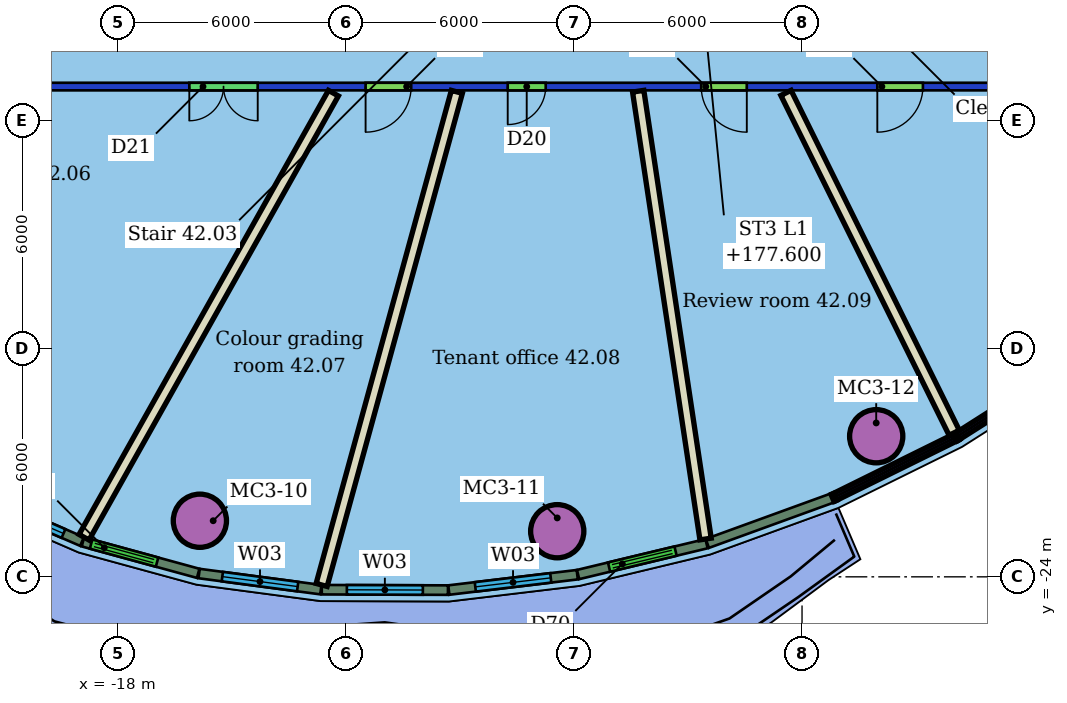
"""IFC4 building model, lengths in metres.
Left out: names, types, materials, properties, quantities, classifications, styles, units other than length and angle.
Written with IfcOpenShell. Run it as: python <this file> out.ifc"""

import sys

from ifc_helpers import new_model, si_unit, direction, frame, frame_2d, origin, origin_2d, place, context, subcontext, project, spatial, rectangle, hollow_circle, extrude, element, fill, save


model = new_model("IFC4")
c1 = context("Model", 3, precision=1e-05, world=origin(), true_north=direction((0.0, 1.0)))
c2 = subcontext(c1, "Body", "Model", "MODEL_VIEW")
j1 = project(units=[si_unit("LENGTHUNIT", "METRE"), si_unit("PLANEANGLEUNIT", "RADIAN")], contexts=[c1])
p1 = place(None, origin())
s1 = spatial("IfcSite", under=j1, at=p1, CompositionType="ELEMENT")
p2 = place(p1, origin())
s2 = spatial("IfcBuilding", under=s1, at=p2, CompositionType="ELEMENT")
p3 = place(p2, frame((0.0, 0.0, 175.8)))
s3 = spatial("IfcBuildingStorey", under=s2, at=p3, CompositionType="ELEMENT", Elevation=175.8)
for number, where, z_axis, x_axis in (
    (1, (-15.845, -22.524, 0.0), (0.0, 0.0, 1.0), (1.0, 0.0, 0.0)),
    (2, (-6.442, -22.8, 0.0), (0.0, 0.0, 1.0), (1.0, 0.0, 0.0)),
    (3, (1.952, -20.301, 0.0), (0.0, 0.0, 1.0), (1.0, 0.0, 0.0)),
):
    element("IfcColumn", number, at=place(p3, frame(where, z_axis=z_axis, x_axis=x_axis)), inside=s3, PredefinedType="COLUMN", context=c2, shape_type="SweptSolid", body=[
        extrude(hollow_circle(Radius=0.7, WallThickness=0.05, at=origin_2d()), origin(), (0.0, 0.0, 1.0), 3.4),
    ])
p4 = place(p3, frame((8.2, -11.1, 0.0), z_axis=(0.0, 0.0, 1.0), x_axis=(-1.0, 0.0, 0.0)))
e4 = element("IfcWall", 4, at=p4, inside=s3, PredefinedType="PARTITIONING", context=c2, shape_type="SweptSolid", body=[
    extrude(rectangle(XDim=28.4, YDim=0.2, at=frame_2d((14.2, 0.0))), origin(), (0.0, 0.0, 1.0), 3.0),
])
p5 = place(p4, frame((22.523, 0.0, 0.0)))
e5 = element("IfcOpeningElement", 5, at=p5, cuts=e4, PredefinedType="OPENING", context=c2, shape_type="SweptSolid", body=[
    extrude(rectangle(XDim=1.8, YDim=2.1, at=frame_2d((0.9, 1.05))), frame((0.0, 0.11, 0.0), z_axis=(0.0, -1.0, 0.0), x_axis=(1.0, 0.0, 0.0)), (0.0, 0.0, 1.0), 0.22),
])
p6 = place(p4, frame((18.485, 0.0, 0.0)))
e6 = element("IfcOpeningElement", 6, at=p6, cuts=e4, PredefinedType="OPENING", context=c2, shape_type="SweptSolid", body=[
    extrude(rectangle(XDim=1.2, YDim=2.1, at=frame_2d((0.6, 1.05))), frame((0.0, 0.11, 0.0), z_axis=(0.0, -1.0, 0.0), x_axis=(1.0, 0.0, 0.0)), (0.0, 0.0, 1.0), 0.22),
])
p7 = place(p4, frame((14.945, 0.0, 0.0)))
e7 = element("IfcOpeningElement", 7, at=p7, cuts=e4, PredefinedType="OPENING", context=c2, shape_type="SweptSolid", body=[
    extrude(rectangle(XDim=1.0, YDim=2.1, at=frame_2d((0.5, 1.05))), frame((0.0, 0.11, 0.0), z_axis=(0.0, -1.0, 0.0), x_axis=(1.0, 0.0, 0.0)), (0.0, 0.0, 1.0), 0.22),
])
p8 = place(p4, frame((9.653, 0.0, 0.0)))
e8 = element("IfcOpeningElement", 8, at=p8, cuts=e4, PredefinedType="OPENING", context=c2, shape_type="SweptSolid", body=[
    extrude(rectangle(XDim=1.2, YDim=2.1, at=frame_2d((0.6, 1.05))), frame((0.0, 0.11, 0.0), z_axis=(0.0, -1.0, 0.0), x_axis=(1.0, 0.0, 0.0)), (0.0, 0.0, 1.0), 0.22),
])
p9 = place(p4, frame((5.019, 0.0, 0.0)))
e9 = element("IfcOpeningElement", 9, at=p9, cuts=e4, PredefinedType="OPENING", context=c2, shape_type="SweptSolid", body=[
    extrude(rectangle(XDim=1.2, YDim=2.1, at=frame_2d((0.6, 1.05))), frame((0.0, 0.11, 0.0), z_axis=(0.0, -1.0, 0.0), x_axis=(1.0, 0.0, 0.0)), (0.0, 0.0, 1.0), 0.22),
])
p10 = place(p3, frame((-18.894, -22.958, 0.0), z_axis=(0.0, 0.0, 1.0), x_axis=(0.489668651608, 0.871908602798, 0.0)))
e10 = element("IfcWall", 10, at=p10, inside=s3, PredefinedType="PARTITIONING", context=c2, shape_type="SweptSolid", body=[
    extrude(rectangle(XDim=13.401, YDim=0.3, at=frame_2d((6.701, 0.0))), origin(), (0.0, 0.0, 1.0), 3.4),
])
p11 = place(p3, frame((-12.641, -24.214, 0.0), z_axis=(0.0, 0.0, 1.0), x_axis=(0.264514468867, 0.964381716832, 0.0)))
e11 = element("IfcWall", 11, at=p11, inside=s3, PredefinedType="PARTITIONING", context=c2, shape_type="SweptSolid", body=[
    extrude(rectangle(XDim=13.453, YDim=0.3, at=frame_2d((6.727, 0.0))), origin(), (0.0, 0.0, 1.0), 3.4),
])
p12 = place(p3, frame((-2.538, -23.005, 0.0), z_axis=(0.0, 0.0, 1.0), x_axis=(-0.14879531589, 0.988868016456, 0.0)))
e12 = element("IfcWall", 12, at=p12, inside=s3, PredefinedType="PARTITIONING", context=c2, shape_type="SweptSolid", body=[
    extrude(rectangle(XDim=11.915, YDim=0.3, at=frame_2d((5.958, 0.0))), origin(), (0.0, 0.0, 1.0), 3.4),
])
p13 = place(p3, frame((4.004, -20.209, 0.0), z_axis=(0.0, 0.0, 1.0), x_axis=(-0.443647752569, 0.896201245056, 0.0)))
e13 = element("IfcWall", 13, at=p13, inside=s3, PredefinedType="PARTITIONING", context=c2, shape_type="SweptSolid", body=[
    extrude(rectangle(XDim=9.979, YDim=0.3, at=frame_2d((4.989, 0.0))), origin(), (0.0, 0.0, 1.0), 3.4),
])
p14 = place(p3, frame((-21.757, -21.853, 0.0), z_axis=(0.0, 0.0, 1.0), x_axis=(0.917458663887, -0.397831120023, 0.0)))
e14 = element("IfcWall", 14, at=p14, inside=s3, PredefinedType="SOLIDWALL", context=c2, shape_type="SweptSolid", body=[
    extrude(rectangle(XDim=3.063, YDim=0.25, at=frame_2d((1.531, 0.0))), origin(), (0.0, 0.0, 1.0), 3.05),
])
p15 = place(p14, frame((0.531, 0.0, 0.9)))
e15 = element("IfcOpeningElement", 15, at=p15, cuts=e14, PredefinedType="OPENING", context=c2, shape_type="SweptSolid", body=[
    extrude(rectangle(XDim=2.0, YDim=2.1, at=frame_2d((1.0, 1.05))), frame((0.0, 0.135, 0.0), z_axis=(0.0, -1.0, 0.0), x_axis=(1.0, 0.0, 0.0)), (0.0, 0.0, 1.0), 0.27),
])
p16 = place(p3, frame((-18.922, -23.08, 0.0), z_axis=(0.0, 0.0, 1.0), x_axis=(0.964636462647, -0.263583942857, 0.0)))
e16 = element("IfcWall", 16, at=p16, inside=s3, PredefinedType="SOLIDWALL", context=c2, shape_type="SweptSolid", body=[
    extrude(rectangle(XDim=3.144, YDim=0.25, at=frame_2d((1.572, 0.0))), origin(), (0.0, 0.0, 1.0), 3.05),
])
p17 = place(p16, frame((0.222, 0.0, 0.0)))
e17 = element("IfcOpeningElement", 17, at=p17, cuts=e16, PredefinedType="OPENING", context=c2, shape_type="SweptSolid", body=[
    extrude(rectangle(XDim=1.8, YDim=2.4, at=frame_2d((0.9, 1.2))), frame((0.0, 0.135, 0.0), z_axis=(0.0, -1.0, 0.0), x_axis=(1.0, 0.0, 0.0)), (0.0, 0.0, 1.0), 0.27),
])
p18 = place(p3, frame((-15.865, -23.913, 0.0), z_axis=(0.0, 0.0, 1.0), x_axis=(0.991363289686, -0.131144301676, 0.0)))
e18 = element("IfcWall", 18, at=p18, inside=s3, PredefinedType="SOLIDWALL", context=c2, shape_type="SweptSolid", body=[
    extrude(rectangle(XDim=3.232, YDim=0.25, at=frame_2d((1.616, 0.0))), origin(), (0.0, 0.0, 1.0), 3.05),
])
p19 = place(p18, frame((0.616, 0.0, 0.9)))
e19 = element("IfcOpeningElement", 19, at=p19, cuts=e18, PredefinedType="OPENING", context=c2, shape_type="SweptSolid", body=[
    extrude(rectangle(XDim=2.0, YDim=2.1, at=frame_2d((1.0, 1.05))), frame((0.0, 0.135, 0.0), z_axis=(0.0, -1.0, 0.0), x_axis=(1.0, 0.0, 0.0)), (0.0, 0.0, 1.0), 0.27),
])
p20 = place(p3, frame((-12.638, -24.339, 0.0), z_axis=(0.0, 0.0, 1.0), x_axis=(0.999994765707, -0.003235515089, 0.0)))
e20 = element("IfcWall", 20, at=p20, inside=s3, PredefinedType="SOLIDWALL", context=c2, shape_type="SweptSolid", body=[
    extrude(rectangle(XDim=3.32, YDim=0.25, at=frame_2d((1.66, 0.0))), origin(), (0.0, 0.0, 1.0), 3.05),
])
p21 = place(p20, frame((0.66, 0.0, 0.9)))
e21 = element("IfcOpeningElement", 21, at=p21, cuts=e20, PredefinedType="OPENING", context=c2, shape_type="SweptSolid", body=[
    extrude(rectangle(XDim=2.0, YDim=2.1, at=frame_2d((1.0, 1.05))), frame((0.0, 0.135, 0.0), z_axis=(0.0, -1.0, 0.0), x_axis=(1.0, 0.0, 0.0)), (0.0, 0.0, 1.0), 0.27),
])
p22 = place(p3, frame((-9.294, -24.348, 0.0), z_axis=(0.0, 0.0, 1.0), x_axis=(0.992928000629, 0.118718092836, 0.0)))
e22 = element("IfcWall", 22, at=p22, inside=s3, PredefinedType="SOLIDWALL", context=c2, shape_type="SweptSolid", body=[
    extrude(rectangle(XDim=3.404, YDim=0.25, at=frame_2d((1.702, 0.0))), origin(), (0.0, 0.0, 1.0), 3.05),
])
p23 = place(p22, frame((0.702, 0.0, 0.9)))
e23 = element("IfcOpeningElement", 23, at=p23, cuts=e22, PredefinedType="OPENING", context=c2, shape_type="SweptSolid", body=[
    extrude(rectangle(XDim=2.0, YDim=2.1, at=frame_2d((1.0, 1.05))), frame((0.0, 0.135, 0.0), z_axis=(0.0, -1.0, 0.0), x_axis=(1.0, 0.0, 0.0)), (0.0, 0.0, 1.0), 0.27),
])
p24 = place(p3, frame((-5.893, -23.94, 0.0), z_axis=(0.0, 0.0, 1.0), x_axis=(0.97230053317, 0.233734193469, 0.0)))
e24 = element("IfcWall", 24, at=p24, inside=s3, PredefinedType="SOLIDWALL", context=c2, shape_type="SweptSolid", body=[
    extrude(rectangle(XDim=3.476, YDim=0.25, at=frame_2d((1.738, 0.0))), origin(), (0.0, 0.0, 1.0), 3.05),
])
p25 = place(p24, frame((0.838, 0.0, 0.0)))
e25 = element("IfcOpeningElement", 25, at=p25, cuts=e24, PredefinedType="OPENING", context=c2, shape_type="SweptSolid", body=[
    extrude(rectangle(XDim=1.8, YDim=2.4, at=frame_2d((0.9, 1.2))), frame((0.0, 0.135, 0.0), z_axis=(0.0, -1.0, 0.0), x_axis=(1.0, 0.0, 0.0)), (0.0, 0.0, 1.0), 0.27),
])
p26 = place(p3, frame((-2.492, -23.121, 0.0), z_axis=(0.0, 0.0, 1.0), x_axis=(0.939842425933, 0.341608276271, 0.0)))
e26 = element("IfcWall", 26, at=p26, inside=s3, PredefinedType="SOLIDWALL", context=c2, shape_type="SweptSolid", body=[
    extrude(rectangle(XDim=3.49, YDim=0.25, at=frame_2d((1.745, 0.0))), origin(), (0.0, 0.0, 1.0), 3.05),
])
p27 = place(p5, origin())
e27 = element("IfcDoor", 27, at=p27, inside=s3, OperationType="DOUBLE_DOOR_SINGLE_SWING", PredefinedType="DOOR", context=c2, shape_type="SweptSolid", body=[
    extrude(rectangle(XDim=1.8, YDim=2.1, at=frame_2d((0.9, 1.05))), frame((0.0, 0.025, 0.0), z_axis=(0.0, -1.0, 0.0), x_axis=(1.0, 0.0, 0.0)), (0.0, 0.0, 1.0), 0.05),
])
fill(e5, e27)
p28 = place(p6, origin())
e28 = element("IfcDoor", 28, at=p28, inside=s3, OperationType="SINGLE_SWING_RIGHT", PredefinedType="DOOR", context=c2, shape_type="SweptSolid", body=[
    extrude(rectangle(XDim=1.2, YDim=2.1, at=frame_2d((0.6, 1.05))), frame((0.0, 0.025, 0.0), z_axis=(0.0, -1.0, 0.0), x_axis=(1.0, 0.0, 0.0)), (0.0, 0.0, 1.0), 0.05),
])
fill(e6, e28)
p29 = place(p7, origin())
e29 = element("IfcDoor", 29, at=p29, inside=s3, OperationType="SINGLE_SWING_RIGHT", PredefinedType="DOOR", context=c2, shape_type="SweptSolid", body=[
    extrude(rectangle(XDim=1.0, YDim=2.1, at=frame_2d((0.5, 1.05))), frame((0.0, 0.025, 0.0), z_axis=(0.0, -1.0, 0.0), x_axis=(1.0, 0.0, 0.0)), (0.0, 0.0, 1.0), 0.05),
])
fill(e7, e29)
p30 = place(p8, origin())
e30 = element("IfcDoor", 30, at=p30, inside=s3, OperationType="SINGLE_SWING_LEFT", PredefinedType="DOOR", context=c2, shape_type="SweptSolid", body=[
    extrude(rectangle(XDim=1.2, YDim=2.1, at=frame_2d((0.6, 1.05))), frame((0.0, 0.025, 0.0), z_axis=(0.0, -1.0, 0.0), x_axis=(1.0, 0.0, 0.0)), (0.0, 0.0, 1.0), 0.05),
])
fill(e8, e30)
p31 = place(p9, origin())
e31 = element("IfcDoor", 31, at=p31, inside=s3, OperationType="SINGLE_SWING_RIGHT", PredefinedType="DOOR", context=c2, shape_type="SweptSolid", body=[
    extrude(rectangle(XDim=1.2, YDim=2.1, at=frame_2d((0.6, 1.05))), frame((0.0, 0.025, 0.0), z_axis=(0.0, -1.0, 0.0), x_axis=(1.0, 0.0, 0.0)), (0.0, 0.0, 1.0), 0.05),
])
fill(e9, e31)
p32 = place(p15, origin())
e32 = element("IfcWindow", 32, at=p32, inside=s3, PartitioningType="SINGLE_PANEL", PredefinedType="WINDOW", context=c2, shape_type="SweptSolid", body=[
    extrude(rectangle(XDim=2.0, YDim=2.1, at=frame_2d((1.0, 1.05))), frame((0.0, 0.03, 0.0), z_axis=(0.0, -1.0, 0.0), x_axis=(1.0, 0.0, 0.0)), (0.0, 0.0, 1.0), 0.06),
])
fill(e15, e32)
p33 = place(p17, origin())
e33 = element("IfcDoor", 33, at=p33, inside=s3, OperationType="DOUBLE_DOOR_SLIDING", PredefinedType="DOOR", context=c2, shape_type="SweptSolid", body=[
    extrude(rectangle(XDim=1.8, YDim=2.4, at=frame_2d((0.9, 1.2))), frame((0.0, 0.025, 0.0), z_axis=(0.0, -1.0, 0.0), x_axis=(1.0, 0.0, 0.0)), (0.0, 0.0, 1.0), 0.05),
])
fill(e17, e33)
p34 = place(p19, origin())
e34 = element("IfcWindow", 34, at=p34, inside=s3, PartitioningType="SINGLE_PANEL", PredefinedType="WINDOW", context=c2, shape_type="SweptSolid", body=[
    extrude(rectangle(XDim=2.0, YDim=2.1, at=frame_2d((1.0, 1.05))), frame((0.0, 0.03, 0.0), z_axis=(0.0, -1.0, 0.0), x_axis=(1.0, 0.0, 0.0)), (0.0, 0.0, 1.0), 0.06),
])
fill(e19, e34)
p35 = place(p21, origin())
e35 = element("IfcWindow", 35, at=p35, inside=s3, PartitioningType="SINGLE_PANEL", PredefinedType="WINDOW", context=c2, shape_type="SweptSolid", body=[
    extrude(rectangle(XDim=2.0, YDim=2.1, at=frame_2d((1.0, 1.05))), frame((0.0, 0.03, 0.0), z_axis=(0.0, -1.0, 0.0), x_axis=(1.0, 0.0, 0.0)), (0.0, 0.0, 1.0), 0.06),
])
fill(e21, e35)
p36 = place(p23, origin())
e36 = element("IfcWindow", 36, at=p36, inside=s3, PartitioningType="SINGLE_PANEL", PredefinedType="WINDOW", context=c2, shape_type="SweptSolid", body=[
    extrude(rectangle(XDim=2.0, YDim=2.1, at=frame_2d((1.0, 1.05))), frame((0.0, 0.03, 0.0), z_axis=(0.0, -1.0, 0.0), x_axis=(1.0, 0.0, 0.0)), (0.0, 0.0, 1.0), 0.06),
])
fill(e23, e36)
p37 = place(p25, origin())
e37 = element("IfcDoor", 37, at=p37, inside=s3, OperationType="DOUBLE_DOOR_SLIDING", PredefinedType="DOOR", context=c2, shape_type="SweptSolid", body=[
    extrude(rectangle(XDim=1.8, YDim=2.4, at=frame_2d((0.9, 1.2))), frame((0.0, 0.025, 0.0), z_axis=(0.0, -1.0, 0.0), x_axis=(1.0, 0.0, 0.0)), (0.0, 0.0, 1.0), 0.05),
])
fill(e25, e37)
save(model, sys.argv[1])
